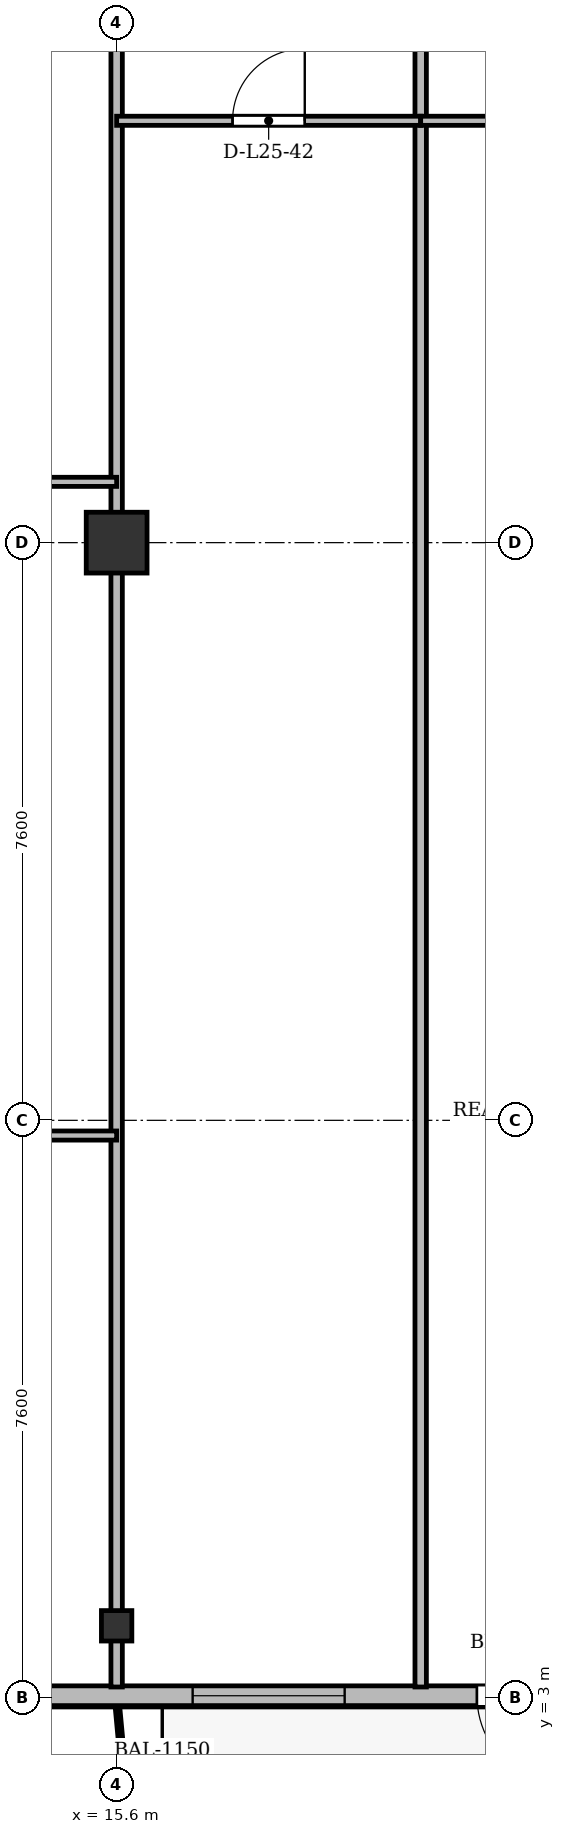
"""IFC4 building model, lengths in metres.
Left out: names, types, materials, properties, quantities, classifications, styles, units other than length and angle.
Written with IfcOpenShell. Run it as: python <this file> out.ifc"""

import sys

from ifc_helpers import new_model, si_unit, direction, frame, frame_2d, origin, origin_2d, place, context, subcontext, project, spatial, rectangle, i_section, extrude, source, transform, mapped, element, fill, save


model = new_model("IFC4")
c1 = context("Model", 3, precision=1e-05, world=origin(), true_north=direction((0.0, 1.0)))
c2 = subcontext(c1, "Body", "Model", "MODEL_VIEW")
j1 = project(units=[si_unit("LENGTHUNIT", "METRE"), si_unit("PLANEANGLEUNIT", "RADIAN")], contexts=[c1])
p1 = place(None, origin())
s1 = spatial("IfcSite", under=j1, at=p1, CompositionType="ELEMENT")
p2 = place(p1, origin())
s2 = spatial("IfcBuilding", under=s1, at=p2, CompositionType="ELEMENT")
p3 = place(p2, frame((0.0, 0.0, 99.7)))
s3 = spatial("IfcBuildingStorey", under=s2, at=p3, CompositionType="ELEMENT", Elevation=99.7)
m1 = source(origin(), c2, "Body", "SweptSolid", [
    extrude(i_section(OverallWidth=0.4, OverallDepth=0.4, WebThickness=0.022, FlangeThickness=0.035, at=origin_2d()), origin(), (0.0, 0.0, 1.0), 3.6),
])
p4 = place(p3, frame((15.6, 3.95, 0.0), z_axis=(0.0, 0.0, 1.0), x_axis=(1.0, 0.0, 0.0)))
e1 = element("IfcColumn", 1, at=p4, inside=s3, PredefinedType="COLUMN", context=c2, shape_type="MappedRepresentation", body=[
    mapped(m1, transform((0.0, 0.0, 0.0), x_axis=(1.0, 0.0, 0.0), y_axis=(0.0, 1.0, 0.0), z_axis=(0.0, 0.0, 1.0), scale=1.0)),
])
m2 = source(origin(), c2, "Body", "SweptSolid", [
    extrude(rectangle(XDim=0.8, YDim=0.8, at=origin_2d()), origin(), (0.0, 0.0, 1.0), 3.6),
])
p5 = place(p3, frame((15.6, 18.2, 0.0), z_axis=(0.0, 0.0, 1.0), x_axis=(1.0, 0.0, 0.0)))
e2 = element("IfcColumn", 2, at=p5, inside=s3, PredefinedType="COLUMN", context=c2, shape_type="MappedRepresentation", body=[
    mapped(m2, transform((0.0, 0.0, 0.0), x_axis=(1.0, 0.0, 0.0), y_axis=(0.0, 1.0, 0.0), z_axis=(0.0, 0.0, 1.0), scale=1.0)),
])
p6 = place(p3, frame((66.9, 3.03, 0.0), z_axis=(0.0, 0.0, 1.0), x_axis=(-1.0, 0.0, 0.0)))
e3 = element("IfcWall", 3, at=p6, inside=s3, PredefinedType="SOLIDWALL", context=c2, shape_type="SweptSolid", body=[
    extrude(rectangle(XDim=59.4, YDim=0.26, at=frame_2d((29.7, 0.0))), origin(), (0.0, 0.0, 1.0), 3.34),
])
p7 = place(p6, frame((1.9, 0.0, 0.9)))
e4 = element("IfcOpeningElement", 4, at=p7, cuts=e3, PredefinedType="OPENING", context=c2, shape_type="SweptSolid", body=[
    extrude(rectangle(XDim=2.2, YDim=1.8, at=frame_2d((1.1, 0.9))), frame((0.0, 0.14, 0.0), z_axis=(0.0, -1.0, 0.0), x_axis=(1.0, 0.0, 0.0)), (0.0, 0.0, 1.0), 0.28),
])
p8 = place(p6, frame((5.65, 0.0, 0.9)))
e5 = element("IfcOpeningElement", 5, at=p8, cuts=e3, PredefinedType="OPENING", context=c2, shape_type="SweptSolid", body=[
    extrude(rectangle(XDim=1.5, YDim=1.75, at=frame_2d((0.75, 0.875))), frame((0.0, 0.14, 0.0), z_axis=(0.0, -1.0, 0.0), x_axis=(1.0, 0.0, 0.0)), (0.0, 0.0, 1.0), 0.28),
])
p9 = place(p6, frame((8.4, 0.0, 0.9)))
e6 = element("IfcOpeningElement", 6, at=p9, cuts=e3, PredefinedType="OPENING", context=c2, shape_type="SweptSolid", body=[
    extrude(rectangle(XDim=2.0, YDim=1.95, at=frame_2d((1.0, 0.975))), frame((0.0, 0.14, 0.0), z_axis=(0.0, -1.0, 0.0), x_axis=(1.0, 0.0, 0.0)), (0.0, 0.0, 1.0), 0.28),
])
p10 = place(p6, frame((11.175, 0.0, 0.9)))
e7 = element("IfcOpeningElement", 7, at=p10, cuts=e3, PredefinedType="OPENING", context=c2, shape_type="SweptSolid", body=[
    extrude(rectangle(XDim=1.65, YDim=1.85, at=frame_2d((0.825, 0.925))), frame((0.0, 0.14, 0.0), z_axis=(0.0, -1.0, 0.0), x_axis=(1.0, 0.0, 0.0)), (0.0, 0.0, 1.0), 0.28),
])
p11 = place(p6, frame((13.7, 0.0, 0.9)))
e8 = element("IfcOpeningElement", 8, at=p11, cuts=e3, PredefinedType="OPENING", context=c2, shape_type="SweptSolid", body=[
    extrude(rectangle(XDim=1.8, YDim=1.8, at=frame_2d((0.9, 0.9))), frame((0.0, 0.14, 0.0), z_axis=(0.0, -1.0, 0.0), x_axis=(1.0, 0.0, 0.0)), (0.0, 0.0, 1.0), 0.28),
])
p12 = place(p6, frame((16.5, 0.0, 0.9)))
e9 = element("IfcOpeningElement", 9, at=p12, cuts=e3, PredefinedType="OPENING", context=c2, shape_type="SweptSolid", body=[
    extrude(rectangle(XDim=2.2, YDim=1.8, at=frame_2d((1.1, 0.9))), frame((0.0, 0.14, 0.0), z_axis=(0.0, -1.0, 0.0), x_axis=(1.0, 0.0, 0.0)), (0.0, 0.0, 1.0), 0.28),
])
p13 = place(p6, frame((20.227, 0.0, 0.0)))
e10 = element("IfcOpeningElement", 10, at=p13, cuts=e3, PredefinedType="OPENING", context=c2, shape_type="SweptSolid", body=[
    extrude(rectangle(XDim=1.2, YDim=2.2, at=frame_2d((0.6, 1.1))), frame((0.0, 0.14, 0.0), z_axis=(0.0, -1.0, 0.0), x_axis=(1.0, 0.0, 0.0)), (0.0, 0.0, 1.0), 0.28),
])
p14 = place(p6, frame((28.7, 0.0, 0.9)))
e11 = element("IfcOpeningElement", 11, at=p14, cuts=e3, PredefinedType="OPENING", context=c2, shape_type="SweptSolid", body=[
    extrude(rectangle(XDim=2.0, YDim=1.95, at=frame_2d((1.0, 0.975))), frame((0.0, 0.14, 0.0), z_axis=(0.0, -1.0, 0.0), x_axis=(1.0, 0.0, 0.0)), (0.0, 0.0, 1.0), 0.28),
])
p15 = place(p6, frame((36.675, 0.0, 0.9)))
e12 = element("IfcOpeningElement", 12, at=p15, cuts=e3, PredefinedType="OPENING", context=c2, shape_type="SweptSolid", body=[
    extrude(rectangle(XDim=1.65, YDim=1.85, at=frame_2d((0.825, 0.925))), frame((0.0, 0.14, 0.0), z_axis=(0.0, -1.0, 0.0), x_axis=(1.0, 0.0, 0.0)), (0.0, 0.0, 1.0), 0.28),
])
p16 = place(p6, frame((39.0, 0.0, 0.9)))
e13 = element("IfcOpeningElement", 13, at=p16, cuts=e3, PredefinedType="OPENING", context=c2, shape_type="SweptSolid", body=[
    extrude(rectangle(XDim=1.8, YDim=1.8, at=frame_2d((0.9, 0.9))), frame((0.0, 0.14, 0.0), z_axis=(0.0, -1.0, 0.0), x_axis=(1.0, 0.0, 0.0)), (0.0, 0.0, 1.0), 0.28),
])
p17 = place(p6, frame((41.55, 0.0, 0.9)))
e14 = element("IfcOpeningElement", 14, at=p17, cuts=e3, PredefinedType="OPENING", context=c2, shape_type="SweptSolid", body=[
    extrude(rectangle(XDim=1.5, YDim=1.75, at=frame_2d((0.75, 0.875))), frame((0.0, 0.14, 0.0), z_axis=(0.0, -1.0, 0.0), x_axis=(1.0, 0.0, 0.0)), (0.0, 0.0, 1.0), 0.28),
])
p18 = place(p6, frame((45.36, 0.0, 0.0)))
e15 = element("IfcOpeningElement", 15, at=p18, cuts=e3, PredefinedType="OPENING", context=c2, shape_type="SweptSolid", body=[
    extrude(rectangle(XDim=1.2, YDim=2.2, at=frame_2d((0.6, 1.1))), frame((0.0, 0.14, 0.0), z_axis=(0.0, -1.0, 0.0), x_axis=(1.0, 0.0, 0.0)), (0.0, 0.0, 1.0), 0.28),
])
p19 = place(p6, frame((48.3, 0.0, 0.9)))
e16 = element("IfcOpeningElement", 16, at=p19, cuts=e3, PredefinedType="OPENING", context=c2, shape_type="SweptSolid", body=[
    extrude(rectangle(XDim=2.0, YDim=1.95, at=frame_2d((1.0, 0.975))), frame((0.0, 0.14, 0.0), z_axis=(0.0, -1.0, 0.0), x_axis=(1.0, 0.0, 0.0)), (0.0, 0.0, 1.0), 0.28),
])
p20 = place(p6, frame((52.175, 0.0, 0.9)))
e17 = element("IfcOpeningElement", 17, at=p20, cuts=e3, PredefinedType="OPENING", context=c2, shape_type="SweptSolid", body=[
    extrude(rectangle(XDim=1.65, YDim=1.85, at=frame_2d((0.825, 0.925))), frame((0.0, 0.14, 0.0), z_axis=(0.0, -1.0, 0.0), x_axis=(1.0, 0.0, 0.0)), (0.0, 0.0, 1.0), 0.28),
])
p21 = place(p6, frame((55.5, 0.0, 0.9)))
e18 = element("IfcOpeningElement", 18, at=p21, cuts=e3, PredefinedType="OPENING", context=c2, shape_type="SweptSolid", body=[
    extrude(rectangle(XDim=1.8, YDim=1.8, at=frame_2d((0.9, 0.9))), frame((0.0, 0.14, 0.0), z_axis=(0.0, -1.0, 0.0), x_axis=(1.0, 0.0, 0.0)), (0.0, 0.0, 1.0), 0.28),
])
p22 = place(p3, frame((15.6, 3.145, 0.0), z_axis=(0.0, 0.0, 1.0), x_axis=(0.0, 1.0, 0.0)))
e19 = element("IfcWall", 19, at=p22, inside=s3, PredefinedType="PARTITIONING", context=c2, shape_type="SweptSolid", body=[
    extrude(rectangle(XDim=24.455, YDim=0.15, at=frame_2d((12.228, 0.0))), origin(), (0.0, 0.0, 1.0), 2.84),
])
p23 = place(p3, frame((19.6, 3.145, 0.0), z_axis=(0.0, 0.0, 1.0), x_axis=(0.0, 1.0, 0.0)))
e20 = element("IfcWall", 20, at=p23, inside=s3, PredefinedType="PARTITIONING", context=c2, shape_type="SweptSolid", body=[
    extrude(rectangle(XDim=24.455, YDim=0.15, at=frame_2d((12.228, 0.0))), origin(), (0.0, 0.0, 1.0), 2.752),
])
p24 = place(p3, frame((8.8, 19.0, 0.0), z_axis=(0.0, 0.0, 1.0), x_axis=(1.0, 0.0, 0.0)))
e21 = element("IfcWall", 21, at=p24, inside=s3, PredefinedType="PARTITIONING", context=c2, shape_type="SweptSolid", body=[
    extrude(rectangle(XDim=6.8, YDim=0.12, at=frame_2d((3.4, 0.0))), origin(), (0.0, 0.0, 1.0), 2.84),
])
p25 = place(p24, frame((2.925, 0.0, 0.0)))
e22 = element("IfcOpeningElement", 22, at=p25, cuts=e21, PredefinedType="OPENING", context=c2, shape_type="SweptSolid", body=[
    extrude(rectangle(XDim=0.95, YDim=2.15, at=frame_2d((0.475, 1.075))), frame((0.0, 0.07, 0.0), z_axis=(0.0, -1.0, 0.0), x_axis=(1.0, 0.0, 0.0)), (0.0, 0.0, 1.0), 0.14),
])
p26 = place(p3, frame((12.2, 10.4, 0.0), z_axis=(0.0, 0.0, 1.0), x_axis=(1.0, 0.0, 0.0)))
e23 = element("IfcWall", 23, at=p26, inside=s3, PredefinedType="PARTITIONING", context=c2, shape_type="SweptSolid", body=[
    extrude(rectangle(XDim=3.4, YDim=0.12, at=frame_2d((1.7, 0.0))), origin(), (0.0, 0.0, 1.0), 2.84),
])
p27 = place(p26, frame((1.131, 0.0, 0.0)))
e24 = element("IfcOpeningElement", 24, at=p27, cuts=e23, PredefinedType="OPENING", context=c2, shape_type="SweptSolid", body=[
    extrude(rectangle(XDim=0.95, YDim=2.15, at=frame_2d((0.475, 1.075))), frame((0.0, 0.07, 0.0), z_axis=(0.0, -1.0, 0.0), x_axis=(1.0, 0.0, 0.0)), (0.0, 0.0, 1.0), 0.14),
])
p28 = place(p3, frame((15.6, 23.75, 0.0), z_axis=(0.0, 0.0, 1.0), x_axis=(1.0, 0.0, 0.0)))
e25 = element("IfcWall", 25, at=p28, inside=s3, PredefinedType="PARTITIONING", context=c2, shape_type="SweptSolid", body=[
    extrude(rectangle(XDim=4.0, YDim=0.12, at=frame_2d((2.0, 0.0))), origin(), (0.0, 0.0, 1.0), 2.84),
])
p29 = place(p28, frame((1.525, 0.0, 0.0)))
e26 = element("IfcOpeningElement", 26, at=p29, cuts=e25, PredefinedType="OPENING", context=c2, shape_type="SweptSolid", body=[
    extrude(rectangle(XDim=0.95, YDim=2.15, at=frame_2d((0.475, 1.075))), frame((0.0, 0.07, 0.0), z_axis=(0.0, -1.0, 0.0), x_axis=(1.0, 0.0, 0.0)), (0.0, 0.0, 1.0), 0.14),
])
p30 = place(p3, frame((19.6, 23.75, 0.0), z_axis=(0.0, 0.0, 1.0), x_axis=(1.0, 0.0, 0.0)))
e27 = element("IfcWall", 27, at=p30, inside=s3, PredefinedType="PARTITIONING", context=c2, shape_type="SweptSolid", body=[
    extrude(rectangle(XDim=3.8, YDim=0.12, at=frame_2d((1.9, 0.0))), origin(), (0.0, 0.0, 1.0), 2.84),
])
p31 = place(p30, frame((1.33, 0.0, 0.0)))
e28 = element("IfcOpeningElement", 28, at=p31, cuts=e27, PredefinedType="OPENING", context=c2, shape_type="SweptSolid", body=[
    extrude(rectangle(XDim=0.95, YDim=2.15, at=frame_2d((0.475, 1.075))), frame((0.0, 0.07, 0.0), z_axis=(0.0, -1.0, 0.0), x_axis=(1.0, 0.0, 0.0)), (0.0, 0.0, 1.0), 0.14),
])
m3 = source(origin(), c2, "Body", "SweptSolid", [
    extrude(rectangle(XDim=1.2, YDim=2.2, at=frame_2d((0.6, 1.1))), frame((0.0, 0.025, 0.0), z_axis=(0.0, -1.0, 0.0), x_axis=(1.0, 0.0, 0.0)), (0.0, 0.0, 1.0), 0.05),
])
p32 = place(p18, origin())
e29 = element("IfcDoor", 29, at=p32, inside=s3, OperationType="SINGLE_SWING_LEFT", PredefinedType="DOOR", context=c2, shape_type="MappedRepresentation", body=[
    mapped(m3, transform((0.0, 0.0, 0.0), x_axis=(1.0, 0.0, 0.0), y_axis=(0.0, 1.0, 0.0), z_axis=(0.0, 0.0, 1.0), scale=1.0)),
])
fill(e15, e29)
m4 = source(origin(), c2, "Body", "SweptSolid", [
    extrude(rectangle(XDim=2.0, YDim=1.95, at=frame_2d((1.0, 0.975))), frame((0.0, 0.03, 0.0), z_axis=(0.0, -1.0, 0.0), x_axis=(1.0, 0.0, 0.0)), (0.0, 0.0, 1.0), 0.06),
])
p33 = place(p19, origin())
e30 = element("IfcWindow", 30, at=p33, inside=s3, PartitioningType="SINGLE_PANEL", PredefinedType="WINDOW", context=c2, shape_type="MappedRepresentation", body=[
    mapped(m4, transform((0.0, 0.0, 0.0), x_axis=(1.0, 0.0, 0.0), y_axis=(0.0, 1.0, 0.0), z_axis=(0.0, 0.0, 1.0), scale=1.0)),
])
fill(e16, e30)
m5 = source(origin(), c2, "Body", "SweptSolid", [
    extrude(rectangle(XDim=0.95, YDim=2.15, at=frame_2d((0.475, 1.075))), frame((0.0, 0.025, 0.0), z_axis=(0.0, -1.0, 0.0), x_axis=(1.0, 0.0, 0.0)), (0.0, 0.0, 1.0), 0.05),
])
p34 = place(p29, origin())
e31 = element("IfcDoor", 31, at=p34, inside=s3, OperationType="SINGLE_SWING_RIGHT", PredefinedType="DOOR", context=c2, shape_type="MappedRepresentation", body=[
    mapped(m5, transform((0.0, 0.0, 0.0), x_axis=(1.0, 0.0, 0.0), y_axis=(0.0, 1.0, 0.0), z_axis=(0.0, 0.0, 1.0), scale=1.0)),
])
fill(e26, e31)
save(model, sys.argv[1])
